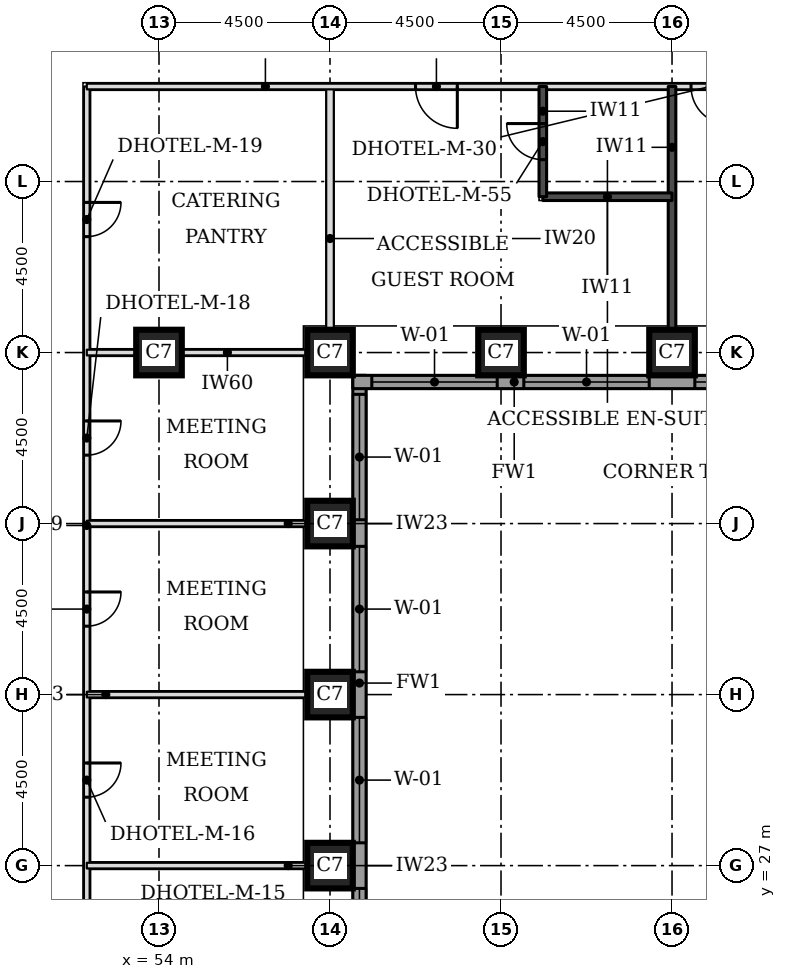
"""IFC4 building model, lengths in metres.
Left out: names, types, materials, properties, quantities, classifications, styles, units other than length and angle.
Written with IfcOpenShell. Run it as: python <this file> out.ifc"""

import sys

from ifc_helpers import new_model, si_unit, direction, frame, frame_2d, origin, origin_2d, place, context, subcontext, project, spatial, rectangle, extrude, element, fill, save


model = new_model("IFC4")
c1 = context("Model", 3, precision=1e-05, world=origin(), true_north=direction((0.0, 1.0)))
c2 = subcontext(c1, "Body", "Model", "MODEL_VIEW")
j1 = project(units=[si_unit("LENGTHUNIT", "METRE"), si_unit("PLANEANGLEUNIT", "RADIAN")], contexts=[c1])
p1 = place(None, origin())
s1 = spatial("IfcSite", under=j1, at=p1, CompositionType="ELEMENT")
p2 = place(p1, origin())
s2 = spatial("IfcBuilding", under=s1, at=p2, CompositionType="ELEMENT")
p3 = place(p2, frame((0.0, 0.0, 23.1)))
s3 = spatial("IfcBuildingStorey", under=s2, at=p3, CompositionType="ELEMENT", Elevation=23.1)
for number, where, z_axis, x_axis in (
    (1, (58.5, 27.0, 0.0), (0.0, 0.0, 1.0), (1.0, 0.0, 0.0)),
    (2, (58.5, 31.5, 0.0), (0.0, 0.0, 1.0), (1.0, 0.0, 0.0)),
    (3, (58.5, 36.0, 0.0), (0.0, 0.0, 1.0), (1.0, 0.0, 0.0)),
    (4, (54.0, 40.5, 0.0), (0.0, 0.0, 1.0), (1.0, 0.0, 0.0)),
    (5, (58.5, 40.5, 0.0), (0.0, 0.0, 1.0), (1.0, 0.0, 0.0)),
    (6, (63.0, 40.5, 0.0), (0.0, 0.0, 1.0), (1.0, 0.0, 0.0)),
    (7, (67.5, 40.5, 0.0), (0.0, 0.0, 1.0), (1.0, 0.0, 0.0)),
):
    element("IfcColumn", number, at=place(p3, frame(where, z_axis=z_axis, x_axis=x_axis)), inside=s3, PredefinedType="COLUMN", context=c2, shape_type="SweptSolid", body=[
        extrude(rectangle(XDim=1.2, YDim=1.2, at=origin_2d()), origin(), (0.0, 0.0, 1.0), 3.3),
    ])
p4 = place(p3, frame((59.275, 22.106, 0.0), z_axis=(0.0, 0.0, 1.0), x_axis=(0.0, 1.0, 0.0)))
e8 = element("IfcWall", 8, at=p4, inside=s3, PredefinedType="STANDARD", context=c2, shape_type="SweptSolid", body=[
    extrude(rectangle(XDim=17.793, YDim=0.35, at=frame_2d((8.897, 0.0))), origin(), (0.0, 0.0, 1.0), 3.055),
])
p5 = place(p4, frame((0.993, 0.0, 0.8)))
e9 = element("IfcOpeningElement", 9, at=p5, cuts=e8, PredefinedType="OPENING", context=c2, shape_type="SweptSolid", body=[
    extrude(rectangle(XDim=3.3, YDim=1.5, at=frame_2d((1.65, 0.75))), frame((0.0, 0.185, 0.0), z_axis=(0.0, -1.0, 0.0), x_axis=(1.0, 0.0, 0.0)), (0.0, 0.0, 1.0), 0.37),
])
p6 = place(p4, frame((5.493, 0.0, 0.8)))
e10 = element("IfcOpeningElement", 10, at=p6, cuts=e8, PredefinedType="OPENING", context=c2, shape_type="SweptSolid", body=[
    extrude(rectangle(XDim=3.3, YDim=1.5, at=frame_2d((1.65, 0.75))), frame((0.0, 0.185, 0.0), z_axis=(0.0, -1.0, 0.0), x_axis=(1.0, 0.0, 0.0)), (0.0, 0.0, 1.0), 0.37),
])
p7 = place(p4, frame((9.993, 0.0, 0.8)))
e11 = element("IfcOpeningElement", 11, at=p7, cuts=e8, PredefinedType="OPENING", context=c2, shape_type="SweptSolid", body=[
    extrude(rectangle(XDim=3.3, YDim=1.5, at=frame_2d((1.65, 0.75))), frame((0.0, 0.185, 0.0), z_axis=(0.0, -1.0, 0.0), x_axis=(1.0, 0.0, 0.0)), (0.0, 0.0, 1.0), 0.37),
])
p8 = place(p4, frame((13.993, 0.0, 0.8)))
e12 = element("IfcOpeningElement", 12, at=p8, cuts=e8, PredefinedType="OPENING", context=c2, shape_type="SweptSolid", body=[
    extrude(rectangle(XDim=3.3, YDim=1.5, at=frame_2d((1.65, 0.75))), frame((0.0, 0.185, 0.0), z_axis=(0.0, -1.0, 0.0), x_axis=(1.0, 0.0, 0.0)), (0.0, 0.0, 1.0), 0.37),
])
p9 = place(p3, frame((59.1, 39.725, 0.0), z_axis=(0.0, 0.0, 1.0), x_axis=(1.0, 0.0, 0.0)))
e13 = element("IfcWall", 13, at=p9, inside=s3, PredefinedType="STANDARD", context=c2, shape_type="SweptSolid", body=[
    extrude(rectangle(XDim=13.293, YDim=0.35, at=frame_2d((6.647, 0.0))), origin(), (0.0, 0.0, 1.0), 3.055),
])
p10 = place(p9, frame((0.5, 0.0, 0.8)))
e14 = element("IfcOpeningElement", 14, at=p10, cuts=e13, PredefinedType="OPENING", context=c2, shape_type="SweptSolid", body=[
    extrude(rectangle(XDim=3.3, YDim=1.5, at=frame_2d((1.65, 0.75))), frame((0.0, 0.185, 0.0), z_axis=(0.0, -1.0, 0.0), x_axis=(1.0, 0.0, 0.0)), (0.0, 0.0, 1.0), 0.37),
])
p11 = place(p9, frame((4.5, 0.0, 0.8)))
e15 = element("IfcOpeningElement", 15, at=p11, cuts=e13, PredefinedType="OPENING", context=c2, shape_type="SweptSolid", body=[
    extrude(rectangle(XDim=3.3, YDim=1.5, at=frame_2d((1.65, 0.75))), frame((0.0, 0.185, 0.0), z_axis=(0.0, -1.0, 0.0), x_axis=(1.0, 0.0, 0.0)), (0.0, 0.0, 1.0), 0.37),
])
p12 = place(p9, frame((9.0, 0.0, 0.8)))
e16 = element("IfcOpeningElement", 16, at=p12, cuts=e13, PredefinedType="OPENING", context=c2, shape_type="SweptSolid", body=[
    extrude(rectangle(XDim=3.3, YDim=1.5, at=frame_2d((1.65, 0.75))), frame((0.0, 0.185, 0.0), z_axis=(0.0, -1.0, 0.0), x_axis=(1.0, 0.0, 0.0)), (0.0, 0.0, 1.0), 0.37),
])
p13 = place(p3, frame((58.5, 41.1, 0.0), z_axis=(0.0, 0.0, 1.0), x_axis=(0.0, 1.0, 0.0)))
e17 = element("IfcWall", 17, at=p13, inside=s3, PredefinedType="PARTITIONING", context=c2, shape_type="SweptSolid", body=[
    extrude(rectangle(XDim=6.4, YDim=0.2, at=frame_2d((3.2, 0.0))), origin(), (0.0, 0.0, 1.0), 3.08),
])
p14 = place(p3, frame((52.1, 24.4, 0.0), z_axis=(0.0, 0.0, 1.0), x_axis=(0.0, 1.0, 0.0)))
e18 = element("IfcWall", 18, at=p14, inside=s3, PredefinedType="PARTITIONING", context=c2, shape_type="SweptSolid", body=[
    extrude(rectangle(XDim=23.1, YDim=0.15, at=frame_2d((11.55, 0.0))), origin(), (0.0, 0.0, 1.0), 3.08),
])
p15 = place(p14, frame((0.447, 0.0, 0.0)))
e19 = element("IfcOpeningElement", 19, at=p15, cuts=e18, PredefinedType="OPENING", context=c2, shape_type="SweptSolid", body=[
    extrude(rectangle(XDim=0.9, YDim=2.1, at=frame_2d((0.45, 1.05))), frame((0.0, 0.085, 0.0), z_axis=(0.0, -1.0, 0.0), x_axis=(1.0, 0.0, 0.0)), (0.0, 0.0, 1.0), 0.17),
])
p16 = place(p14, frame((4.4, 0.0, 0.0)))
e20 = element("IfcOpeningElement", 20, at=p16, cuts=e18, PredefinedType="OPENING", context=c2, shape_type="SweptSolid", body=[
    extrude(rectangle(XDim=0.9, YDim=2.1, at=frame_2d((0.45, 1.05))), frame((0.0, 0.085, 0.0), z_axis=(0.0, -1.0, 0.0), x_axis=(1.0, 0.0, 0.0)), (0.0, 0.0, 1.0), 0.17),
])
p17 = place(p14, frame((8.9, 0.0, 0.0)))
e21 = element("IfcOpeningElement", 21, at=p17, cuts=e18, PredefinedType="OPENING", context=c2, shape_type="SweptSolid", body=[
    extrude(rectangle(XDim=0.9, YDim=2.1, at=frame_2d((0.45, 1.05))), frame((0.0, 0.085, 0.0), z_axis=(0.0, -1.0, 0.0), x_axis=(1.0, 0.0, 0.0)), (0.0, 0.0, 1.0), 0.17),
])
p18 = place(p14, frame((13.4, 0.0, 0.0)))
e22 = element("IfcOpeningElement", 22, at=p18, cuts=e18, PredefinedType="OPENING", context=c2, shape_type="SweptSolid", body=[
    extrude(rectangle(XDim=0.9, YDim=2.1, at=frame_2d((0.45, 1.05))), frame((0.0, 0.085, 0.0), z_axis=(0.0, -1.0, 0.0), x_axis=(1.0, 0.0, 0.0)), (0.0, 0.0, 1.0), 0.17),
])
p19 = place(p14, frame((19.15, 0.0, 0.0)))
e23 = element("IfcOpeningElement", 23, at=p19, cuts=e18, PredefinedType="OPENING", context=c2, shape_type="SweptSolid", body=[
    extrude(rectangle(XDim=0.9, YDim=2.1, at=frame_2d((0.45, 1.05))), frame((0.0, 0.085, 0.0), z_axis=(0.0, -1.0, 0.0), x_axis=(1.0, 0.0, 0.0)), (0.0, 0.0, 1.0), 0.17),
])
p20 = place(p3, frame((52.1, 47.5, 0.0), z_axis=(0.0, 0.0, 1.0), x_axis=(1.0, 0.0, 0.0)))
e24 = element("IfcWall", 24, at=p20, inside=s3, PredefinedType="PARTITIONING", context=c2, shape_type="SweptSolid", body=[
    extrude(rectangle(XDim=17.4, YDim=0.15, at=frame_2d((8.7, 0.0))), origin(), (0.0, 0.0, 1.0), 3.08),
])
p21 = place(p20, frame((8.65, 0.0, 0.0)))
e25 = element("IfcOpeningElement", 25, at=p21, cuts=e24, PredefinedType="OPENING", context=c2, shape_type="SweptSolid", body=[
    extrude(rectangle(XDim=1.1, YDim=2.1, at=frame_2d((0.55, 1.05))), frame((0.0, 0.085, 0.0), z_axis=(0.0, -1.0, 0.0), x_axis=(1.0, 0.0, 0.0)), (0.0, 0.0, 1.0), 0.17),
])
p22 = place(p20, frame((15.9, 0.0, 0.0)))
e26 = element("IfcOpeningElement", 26, at=p22, cuts=e24, PredefinedType="OPENING", context=c2, shape_type="SweptSolid", body=[
    extrude(rectangle(XDim=1.0, YDim=2.1, at=frame_2d((0.5, 1.05))), frame((0.0, 0.085, 0.0), z_axis=(0.0, -1.0, 0.0), x_axis=(1.0, 0.0, 0.0)), (0.0, 0.0, 1.0), 0.17),
])
p23 = place(p3, frame((67.5, 41.1, 0.0), z_axis=(0.0, 0.0, 1.0), x_axis=(0.0, 1.0, 0.0)))
e27 = element("IfcWall", 27, at=p23, inside=s3, PredefinedType="SOLIDWALL", context=c2, shape_type="SweptSolid", body=[
    extrude(rectangle(XDim=6.4, YDim=0.2, at=frame_2d((3.2, 0.0))), origin(), (0.0, 0.0, 1.0), 3.08),
])
p24 = place(p3, frame((64.1, 44.6, 0.0), z_axis=(0.0, 0.0, 1.0), x_axis=(1.0, 0.0, 0.0)))
e28 = element("IfcWall", 28, at=p24, inside=s3, PredefinedType="SOLIDWALL", context=c2, shape_type="SweptSolid", body=[
    extrude(rectangle(XDim=3.4, YDim=0.2, at=frame_2d((1.7, 0.0))), origin(), (0.0, 0.0, 1.0), 3.08),
])
p25 = place(p3, frame((64.1, 44.6, 0.0), z_axis=(0.0, 0.0, 1.0), x_axis=(0.0, 1.0, 0.0)))
e29 = element("IfcWall", 29, at=p25, inside=s3, PredefinedType="SOLIDWALL", context=c2, shape_type="SweptSolid", body=[
    extrude(rectangle(XDim=2.9, YDim=0.2, at=frame_2d((1.45, 0.0))), origin(), (0.0, 0.0, 1.0), 3.08),
])
p26 = place(p25, frame((0.975, 0.0, 0.0)))
e30 = element("IfcOpeningElement", 30, at=p26, cuts=e29, PredefinedType="OPENING", context=c2, shape_type="SweptSolid", body=[
    extrude(rectangle(XDim=0.95, YDim=2.1, at=frame_2d((0.475, 1.05))), frame((0.0, 0.11, 0.0), z_axis=(0.0, -1.0, 0.0), x_axis=(1.0, 0.0, 0.0)), (0.0, 0.0, 1.0), 0.22),
])
for number, where, z_axis, x_axis in (
    (31, (52.1, 27.0, 0.0), (0.0, 0.0, 1.0), (1.0, 0.0, 0.0)),
    (32, (52.1, 31.5, 0.0), (0.0, 0.0, 1.0), (1.0, 0.0, 0.0)),
    (33, (52.1, 36.0, 0.0), (0.0, 0.0, 1.0), (1.0, 0.0, 0.0)),
):
    element("IfcWall", number, at=place(p3, frame(where, z_axis=z_axis, x_axis=x_axis)), inside=s3, PredefinedType="PARTITIONING", context=c2, shape_type="SweptSolid", body=[
        extrude(rectangle(XDim=5.8, YDim=0.15, at=frame_2d((2.9, 0.0))), origin(), (0.0, 0.0, 1.0), 3.08),
    ])
p27 = place(p3, frame((52.1, 40.5, 0.0), z_axis=(0.0, 0.0, 1.0), x_axis=(1.0, 0.0, 0.0)))
e34 = element("IfcWall", 34, at=p27, inside=s3, PredefinedType="PARTITIONING", context=c2, shape_type="SweptSolid", body=[
    extrude(rectangle(XDim=5.8, YDim=0.15, at=frame_2d((2.9, 0.0))), origin(), (0.0, 0.0, 1.0), 2.33),
])
p28 = place(p5, origin())
e35 = element("IfcWindow", 35, at=p28, inside=s3, PartitioningType="SINGLE_PANEL", PredefinedType="WINDOW", context=c2, shape_type="SweptSolid", body=[
    extrude(rectangle(XDim=3.3, YDim=1.5, at=frame_2d((1.65, 0.75))), frame((0.0, 0.085, 0.0), z_axis=(0.0, -1.0, 0.0), x_axis=(1.0, 0.0, 0.0)), (0.0, 0.0, 1.0), 0.06),
])
fill(e9, e35)
p29 = place(p6, origin())
e36 = element("IfcWindow", 36, at=p29, inside=s3, PartitioningType="SINGLE_PANEL", PredefinedType="WINDOW", context=c2, shape_type="SweptSolid", body=[
    extrude(rectangle(XDim=3.3, YDim=1.5, at=frame_2d((1.65, 0.75))), frame((0.0, 0.085, 0.0), z_axis=(0.0, -1.0, 0.0), x_axis=(1.0, 0.0, 0.0)), (0.0, 0.0, 1.0), 0.06),
])
fill(e10, e36)
p30 = place(p7, origin())
e37 = element("IfcWindow", 37, at=p30, inside=s3, PartitioningType="SINGLE_PANEL", PredefinedType="WINDOW", context=c2, shape_type="SweptSolid", body=[
    extrude(rectangle(XDim=3.3, YDim=1.5, at=frame_2d((1.65, 0.75))), frame((0.0, 0.085, 0.0), z_axis=(0.0, -1.0, 0.0), x_axis=(1.0, 0.0, 0.0)), (0.0, 0.0, 1.0), 0.06),
])
fill(e11, e37)
p31 = place(p8, origin())
e38 = element("IfcWindow", 38, at=p31, inside=s3, PartitioningType="SINGLE_PANEL", PredefinedType="WINDOW", context=c2, shape_type="SweptSolid", body=[
    extrude(rectangle(XDim=3.3, YDim=1.5, at=frame_2d((1.65, 0.75))), frame((0.0, 0.085, 0.0), z_axis=(0.0, -1.0, 0.0), x_axis=(1.0, 0.0, 0.0)), (0.0, 0.0, 1.0), 0.06),
])
fill(e12, e38)
p32 = place(p10, origin())
e39 = element("IfcWindow", 39, at=p32, inside=s3, PartitioningType="SINGLE_PANEL", PredefinedType="WINDOW", context=c2, shape_type="SweptSolid", body=[
    extrude(rectangle(XDim=3.3, YDim=1.5, at=frame_2d((1.65, 0.75))), frame((0.0, 0.085, 0.0), z_axis=(0.0, -1.0, 0.0), x_axis=(1.0, 0.0, 0.0)), (0.0, 0.0, 1.0), 0.06),
])
fill(e14, e39)
p33 = place(p11, origin())
e40 = element("IfcWindow", 40, at=p33, inside=s3, PartitioningType="SINGLE_PANEL", PredefinedType="WINDOW", context=c2, shape_type="SweptSolid", body=[
    extrude(rectangle(XDim=3.3, YDim=1.5, at=frame_2d((1.65, 0.75))), frame((0.0, 0.085, 0.0), z_axis=(0.0, -1.0, 0.0), x_axis=(1.0, 0.0, 0.0)), (0.0, 0.0, 1.0), 0.06),
])
fill(e15, e40)
p34 = place(p12, origin())
e41 = element("IfcWindow", 41, at=p34, inside=s3, PartitioningType="SINGLE_PANEL", PredefinedType="WINDOW", context=c2, shape_type="SweptSolid", body=[
    extrude(rectangle(XDim=3.3, YDim=1.5, at=frame_2d((1.65, 0.75))), frame((0.0, 0.085, 0.0), z_axis=(0.0, -1.0, 0.0), x_axis=(1.0, 0.0, 0.0)), (0.0, 0.0, 1.0), 0.06),
])
fill(e16, e41)
p35 = place(p16, frame((0.9, 0.0, 0.0), z_axis=(0.0, 0.0, 1.0), x_axis=(-1.0, 0.0, 0.0)))
e42 = element("IfcDoor", 42, at=p35, inside=s3, OperationType="SINGLE_SWING_LEFT", PredefinedType="DOOR", context=c2, shape_type="SweptSolid", body=[
    extrude(rectangle(XDim=0.9, YDim=2.1, at=frame_2d((0.45, 1.05))), frame((0.0, 0.025, 0.0), z_axis=(0.0, -1.0, 0.0), x_axis=(1.0, 0.0, 0.0)), (0.0, 0.0, 1.0), 0.05),
])
fill(e20, e42)
p36 = place(p17, frame((0.9, 0.0, 0.0), z_axis=(0.0, 0.0, 1.0), x_axis=(-1.0, 0.0, 0.0)))
e43 = element("IfcDoor", 43, at=p36, inside=s3, OperationType="SINGLE_SWING_LEFT", PredefinedType="DOOR", context=c2, shape_type="SweptSolid", body=[
    extrude(rectangle(XDim=0.9, YDim=2.1, at=frame_2d((0.45, 1.05))), frame((0.0, 0.025, 0.0), z_axis=(0.0, -1.0, 0.0), x_axis=(1.0, 0.0, 0.0)), (0.0, 0.0, 1.0), 0.05),
])
fill(e21, e43)
p37 = place(p18, frame((0.9, 0.0, 0.0), z_axis=(0.0, 0.0, 1.0), x_axis=(-1.0, 0.0, 0.0)))
e44 = element("IfcDoor", 44, at=p37, inside=s3, OperationType="SINGLE_SWING_LEFT", PredefinedType="DOOR", context=c2, shape_type="SweptSolid", body=[
    extrude(rectangle(XDim=0.9, YDim=2.1, at=frame_2d((0.45, 1.05))), frame((0.0, 0.025, 0.0), z_axis=(0.0, -1.0, 0.0), x_axis=(1.0, 0.0, 0.0)), (0.0, 0.0, 1.0), 0.05),
])
fill(e22, e44)
p38 = place(p21, frame((1.1, 0.0, 0.0), z_axis=(0.0, 0.0, 1.0), x_axis=(-1.0, 0.0, 0.0)))
e45 = element("IfcDoor", 45, at=p38, inside=s3, OperationType="SINGLE_SWING_LEFT", PredefinedType="DOOR", context=c2, shape_type="SweptSolid", body=[
    extrude(rectangle(XDim=1.1, YDim=2.1, at=frame_2d((0.55, 1.05))), frame((0.0, 0.025, 0.0), z_axis=(0.0, -1.0, 0.0), x_axis=(1.0, 0.0, 0.0)), (0.0, 0.0, 1.0), 0.05),
])
fill(e25, e45)
p39 = place(p26, origin())
e46 = element("IfcDoor", 46, at=p39, inside=s3, OperationType="SINGLE_SWING_RIGHT", PredefinedType="DOOR", context=c2, shape_type="SweptSolid", body=[
    extrude(rectangle(XDim=0.95, YDim=2.1, at=frame_2d((0.475, 1.05))), frame((0.0, 0.025, 0.0), z_axis=(0.0, -1.0, 0.0), x_axis=(1.0, 0.0, 0.0)), (0.0, 0.0, 1.0), 0.05),
])
fill(e30, e46)
p40 = place(p22, frame((1.0, 0.0, 0.0), z_axis=(0.0, 0.0, 1.0), x_axis=(-1.0, 0.0, 0.0)))
e47 = element("IfcDoor", 47, at=p40, inside=s3, OperationType="SINGLE_SWING_LEFT", PredefinedType="DOOR", context=c2, shape_type="SweptSolid", body=[
    extrude(rectangle(XDim=1.0, YDim=2.1, at=frame_2d((0.5, 1.05))), frame((0.0, 0.025, 0.0), z_axis=(0.0, -1.0, 0.0), x_axis=(1.0, 0.0, 0.0)), (0.0, 0.0, 1.0), 0.05),
])
fill(e26, e47)
p41 = place(p19, frame((0.9, 0.0, 0.0), z_axis=(0.0, 0.0, 1.0), x_axis=(-1.0, 0.0, 0.0)))
e48 = element("IfcDoor", 48, at=p41, inside=s3, OperationType="SINGLE_SWING_LEFT", PredefinedType="DOOR", context=c2, shape_type="SweptSolid", body=[
    extrude(rectangle(XDim=0.9, YDim=2.1, at=frame_2d((0.45, 1.05))), frame((0.0, 0.025, 0.0), z_axis=(0.0, -1.0, 0.0), x_axis=(1.0, 0.0, 0.0)), (0.0, 0.0, 1.0), 0.05),
])
fill(e23, e48)
save(model, sys.argv[1])
